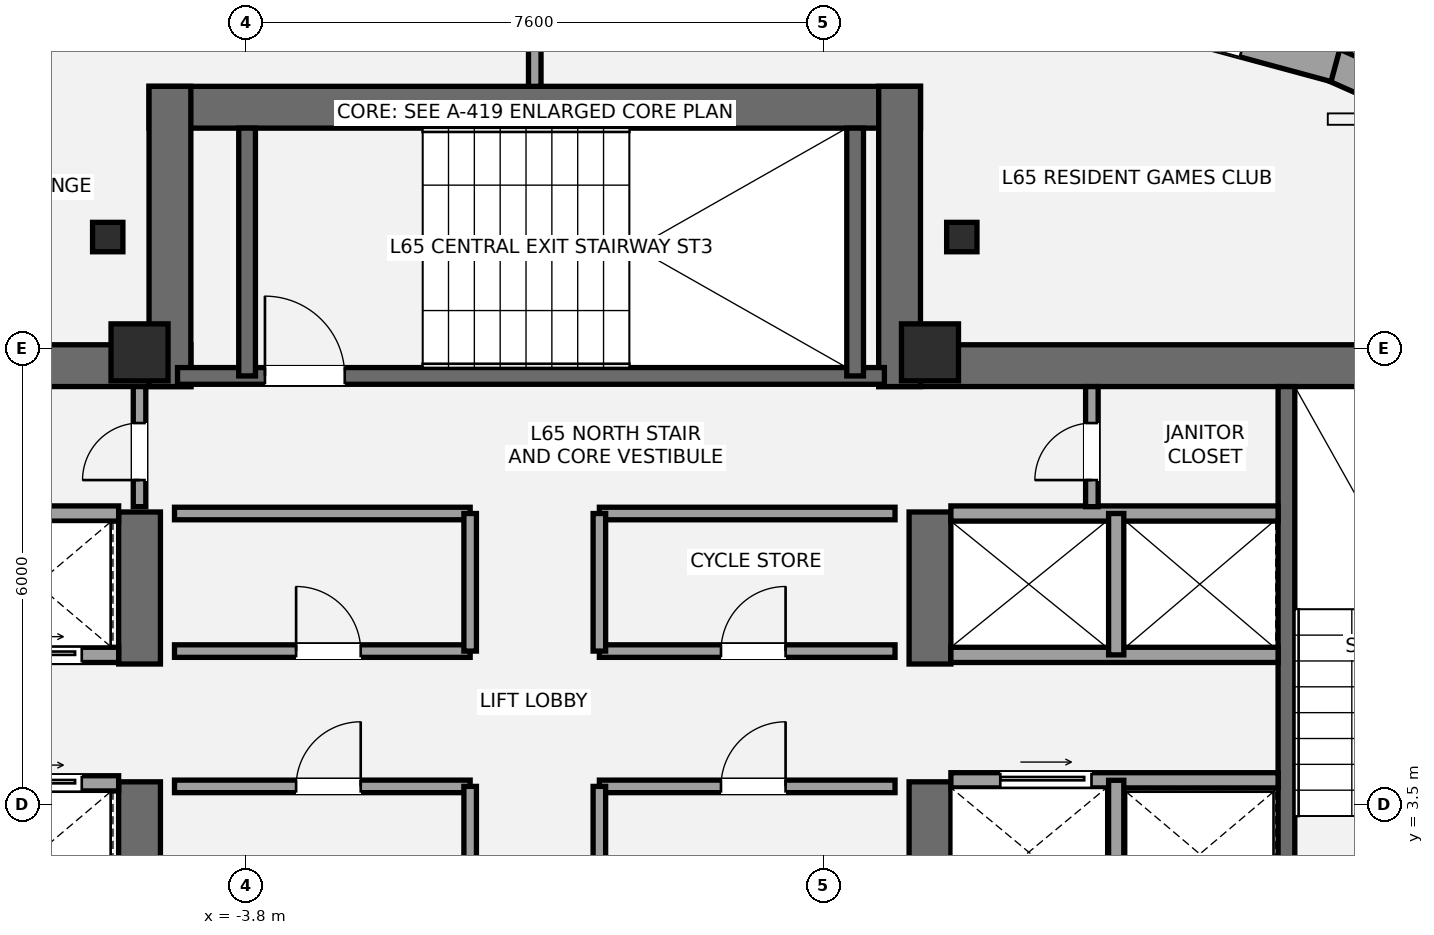
"""IFC4 building model, lengths in metres.
Left out: names, types, materials, properties, quantities, classifications, styles, units other than length and angle.
Written with IfcOpenShell. Run it as: python <this file> out.ifc"""

import sys

from ifc_helpers import new_model, si_unit, direction, frame, frame_2d, origin, origin_2d, place, context, subcontext, project, spatial, rectangle, i_section, extrude, element, fill, save


model = new_model("IFC4")
c1 = context("Model", 3, precision=1e-05, world=origin(), true_north=direction((0.0, 1.0)))
c2 = subcontext(c1, "Body", "Model", "MODEL_VIEW")
j1 = project(units=[si_unit("LENGTHUNIT", "METRE"), si_unit("PLANEANGLEUNIT", "RADIAN")], contexts=[c1])
p1 = place(None, origin())
s1 = spatial("IfcSite", under=j1, at=p1, CompositionType="ELEMENT")
p2 = place(p1, origin())
s2 = spatial("IfcBuilding", under=s1, at=p2, CompositionType="ELEMENT")
p3 = place(p2, frame((0.0, 0.0, 232.05)))
s3 = spatial("IfcBuildingStorey", under=s2, at=p3, CompositionType="ELEMENT", Elevation=232.05)
p4 = place(p3, frame((-13.7, 9.275, 0.0), z_axis=(0.0, 0.0, 1.0), x_axis=(1.0, 0.0, 0.0)))
e1 = element("IfcWall", 1, at=p4, inside=s3, PredefinedType="SHEAR", context=c2, shape_type="SweptSolid", body=[
    extrude(rectangle(XDim=9.175, YDim=0.55, at=frame_2d((4.587, 0.0))), origin(), (0.0, 0.0, 1.0), 3.15),
])
p5 = place(p3, frame((-5.2, 1.3, 0.0), z_axis=(0.0, 0.0, 1.0), x_axis=(0.0, 1.0, 0.0)))
e2 = element("IfcWall", 2, at=p5, inside=s3, PredefinedType="SHEAR", context=c2, shape_type="SweptSolid", body=[
    extrude(rectangle(XDim=2.5, YDim=0.55, at=frame_2d((1.25, 0.0))), origin(), (0.0, 0.0, 1.0), 3.15),
])
p6 = place(p3, frame((-5.2, 5.35, 0.0), z_axis=(0.0, 0.0, 1.0), x_axis=(0.0, 1.0, 0.0)))
e3 = element("IfcWall", 3, at=p6, inside=s3, PredefinedType="SHEAR", context=c2, shape_type="SweptSolid", body=[
    extrude(rectangle(XDim=2.0, YDim=0.55, at=frame_2d((1.0, 0.0))), origin(), (0.0, 0.0, 1.0), 3.15),
])
p7 = place(p3, frame((4.525, 9.275, 0.0), z_axis=(0.0, 0.0, 1.0), x_axis=(1.0, 0.0, 0.0)))
e4 = element("IfcWall", 4, at=p7, inside=s3, PredefinedType="SHEAR", context=c2, shape_type="SweptSolid", body=[
    extrude(rectangle(XDim=9.175, YDim=0.55, at=frame_2d((4.587, 0.0))), origin(), (0.0, 0.0, 1.0), 3.15),
])
p8 = place(p3, frame((5.2, 1.3, 0.0), z_axis=(0.0, 0.0, 1.0), x_axis=(0.0, 1.0, 0.0)))
e5 = element("IfcWall", 5, at=p8, inside=s3, PredefinedType="SHEAR", context=c2, shape_type="SweptSolid", body=[
    extrude(rectangle(XDim=2.5, YDim=0.55, at=frame_2d((1.25, 0.0))), origin(), (0.0, 0.0, 1.0), 3.15),
])
p9 = place(p3, frame((5.2, 5.35, 0.0), z_axis=(0.0, 0.0, 1.0), x_axis=(0.0, 1.0, 0.0)))
e6 = element("IfcWall", 6, at=p9, inside=s3, PredefinedType="SHEAR", context=c2, shape_type="SweptSolid", body=[
    extrude(rectangle(XDim=2.0, YDim=0.55, at=frame_2d((1.0, 0.0))), origin(), (0.0, 0.0, 1.0), 3.15),
])
p10 = place(p3, frame((9.89, 1.85, 0.0), z_axis=(0.0, 0.0, 1.0), x_axis=(0.0, 1.0, 0.0)))
e7 = element("IfcWall", 7, at=p10, inside=s3, PredefinedType="SHEAR", context=c2, shape_type="SweptSolid", body=[
    extrude(rectangle(XDim=7.15, YDim=0.22, at=frame_2d((3.575, 0.0))), origin(), (0.0, 0.0, 1.0), 3.15),
])
p11 = place(p3, frame((-5.075, 12.675, 0.0), z_axis=(0.0, 0.0, 1.0), x_axis=(1.0, 0.0, 0.0)))
e8 = element("IfcWall", 8, at=p11, inside=s3, PredefinedType="SHEAR", context=c2, shape_type="SweptSolid", body=[
    extrude(rectangle(XDim=10.15, YDim=0.55, at=frame_2d((5.075, 0.0))), origin(), (0.0, 0.0, 1.0), 3.15),
])
for number, where, z_axis, x_axis in (
    (9, (-4.8, 9.0, 0.0), (0.0, 0.0, 1.0), (0.0, 1.0, 0.0)),
    (10, (4.8, 9.0, 0.0), (0.0, 0.0, 1.0), (0.0, 1.0, 0.0)),
):
    element("IfcWall", number, at=place(p3, frame(where, z_axis=z_axis, x_axis=x_axis)), inside=s3, PredefinedType="SHEAR", context=c2, shape_type="SweptSolid", body=[
        extrude(rectangle(XDim=3.95, YDim=0.55, at=frame_2d((1.975, 0.0))), origin(), (0.0, 0.0, 1.0), 3.15),
    ])
p12 = place(p3, frame((-4.7, 9.14, 0.0), z_axis=(0.0, 0.0, 1.0), x_axis=(1.0, 0.0, 0.0)))
e11 = element("IfcWall", 11, at=p12, inside=s3, PredefinedType="SHEAR", context=c2, shape_type="SweptSolid", body=[
    extrude(rectangle(XDim=9.3, YDim=0.22, at=frame_2d((4.65, 0.0))), origin(), (0.0, 0.0, 1.0), 3.15),
])
p13 = place(p12, frame((1.15, 0.0, 0.0)))
e12 = element("IfcOpeningElement", 12, at=p13, cuts=e11, PredefinedType="OPENING", context=c2, shape_type="SweptSolid", body=[
    extrude(rectangle(XDim=1.05, YDim=2.15, at=frame_2d((0.525, 1.075))), frame((0.0, 0.12, 0.0), z_axis=(0.0, -1.0, 0.0), x_axis=(1.0, 0.0, 0.0)), (0.0, 0.0, 1.0), 0.24),
])
for number, where, z_axis, x_axis in (
    (13, (-3.785, 9.14, 0.0), (0.0, 0.0, 1.0), (0.0, 1.0, 0.0)),
    (14, (4.215, 9.14, 0.0), (0.0, 0.0, 1.0), (0.0, 1.0, 0.0)),
):
    element("IfcWall", number, at=place(p3, frame(where, z_axis=z_axis, x_axis=x_axis)), inside=s3, PredefinedType="SHEAR", context=c2, shape_type="SweptSolid", body=[
        extrude(rectangle(XDim=3.26, YDim=0.22, at=frame_2d((1.63, 0.0))), origin(), (0.0, 0.0, 1.0), 3.15),
    ])
for number, where, z_axis, x_axis in (
    (15, (-5.2, 9.45, 0.0), (0.0, 0.0, 1.0), (1.0, 0.0, 0.0)),
    (16, (5.2, 9.45, 0.0), (0.0, 0.0, 1.0), (1.0, 0.0, 0.0)),
):
    element("IfcColumn", number, at=place(p3, frame(where, z_axis=z_axis, x_axis=x_axis)), inside=s3, PredefinedType="PILASTER", context=c2, shape_type="SweptSolid", body=[
        extrude(rectangle(XDim=0.75, YDim=0.75, at=origin_2d()), origin(), (0.0, 0.0, 1.0), 3.15),
    ])
for number, where, z_axis, x_axis in (
    (17, (5.619, 10.967, 0.0), (0.0, 0.0, 1.0), (1.0, 0.0, 0.0)),
    (18, (-5.619, 10.967, 0.0), (0.0, 0.0, 1.0), (1.0, 0.0, 0.0)),
):
    element("IfcColumn", number, at=place(p3, frame(where, z_axis=z_axis, x_axis=x_axis)), inside=s3, PredefinedType="COLUMN", context=c2, shape_type="SweptSolid", body=[
        extrude(i_section(OverallWidth=0.399, OverallDepth=0.387, WebThickness=0.021, FlangeThickness=0.033, at=origin_2d()), origin(), (0.0, 0.0, 1.0), 3.15),
    ])
p14 = place(p3, frame((10.502, 13.236, 0.0), z_axis=(0.0, 0.0, 1.0), x_axis=(0.914197700285, -0.405268509501, 0.0)))
e19 = element("IfcWall", 19, at=p14, inside=s3, PredefinedType="STANDARD", context=c2, shape_type="SweptSolid", body=[
    extrude(rectangle(XDim=4.037, YDim=0.44, at=frame_2d((2.019, 0.0))), origin(), (0.0, 0.0, 1.0), 2.336),
])
p15 = place(p14, frame((0.746, 0.0, 0.55)))
e20 = element("IfcOpeningElement", 20, at=p15, cuts=e19, PredefinedType="OPENING", context=c2, shape_type="SweptSolid", body=[
    extrude(rectangle(XDim=1.75, YDim=1.55, at=frame_2d((0.875, 0.775))), frame((0.0, 0.23, 0.0), z_axis=(0.0, -1.0, 0.0), x_axis=(1.0, 0.0, 0.0)), (0.0, 0.0, 1.0), 0.46),
])
p16 = place(p3, frame((6.448, 14.331, 0.0), z_axis=(0.0, 0.0, 1.0), x_axis=(0.965250622562, -0.261325918429, 0.0)))
e21 = element("IfcWall", 21, at=p16, inside=s3, PredefinedType="STANDARD", context=c2, shape_type="SweptSolid", body=[
    extrude(rectangle(XDim=4.233, YDim=0.44, at=frame_2d((2.117, 0.0))), origin(), (0.0, 0.0, 1.0), 2.336),
])
p17 = place(p16, frame((1.59, 0.0, 0.55)))
e22 = element("IfcOpeningElement", 22, at=p17, cuts=e21, PredefinedType="OPENING", context=c2, shape_type="SweptSolid", body=[
    extrude(rectangle(XDim=1.4, YDim=1.55, at=frame_2d((0.7, 0.775))), frame((0.0, 0.23, 0.0), z_axis=(0.0, -1.0, 0.0), x_axis=(1.0, 0.0, 0.0)), (0.0, 0.0, 1.0), 0.46),
])
p18 = place(p3, frame((-9.78, 3.78, 0.0), z_axis=(0.0, 0.0, 1.0), x_axis=(1.0, 0.0, 0.0)))
e23 = element("IfcWall", 23, at=p18, inside=s3, PredefinedType="SOLIDWALL", context=c2, shape_type="SweptSolid", body=[
    extrude(rectangle(XDim=4.305, YDim=0.2, at=frame_2d((2.152, 0.0))), origin(), (0.0, 0.0, 1.0), 2.97),
])
p19 = place(p18, frame((2.72, 0.0, 0.0)))
e24 = element("IfcOpeningElement", 24, at=p19, cuts=e23, PredefinedType="OPENING", context=c2, shape_type="SweptSolid", body=[
    extrude(rectangle(XDim=1.1, YDim=2.2, at=frame_2d((0.55, 1.1))), frame((0.0, 0.11, 0.0), z_axis=(0.0, -1.0, 0.0), x_axis=(1.0, 0.0, 0.0)), (0.0, 0.0, 1.0), 0.22),
])
p20 = place(p3, frame((-9.78, 5.47, 0.0), z_axis=(0.0, 0.0, 1.0), x_axis=(1.0, 0.0, 0.0)))
e25 = element("IfcWall", 25, at=p20, inside=s3, PredefinedType="SOLIDWALL", context=c2, shape_type="SweptSolid", body=[
    extrude(rectangle(XDim=4.305, YDim=0.2, at=frame_2d((2.152, 0.0))), origin(), (0.0, 0.0, 1.0), 2.97),
])
p21 = place(p20, frame((0.55, 0.0, 0.0)))
e26 = element("IfcOpeningElement", 26, at=p21, cuts=e25, PredefinedType="OPENING", context=c2, shape_type="SweptSolid", body=[
    extrude(rectangle(XDim=1.1, YDim=2.2, at=frame_2d((0.55, 1.1))), frame((0.0, 0.11, 0.0), z_axis=(0.0, -1.0, 0.0), x_axis=(1.0, 0.0, 0.0)), (0.0, 0.0, 1.0), 0.22),
])
p22 = place(p20, frame((2.72, 0.0, 0.0)))
e27 = element("IfcOpeningElement", 27, at=p22, cuts=e25, PredefinedType="OPENING", context=c2, shape_type="SweptSolid", body=[
    extrude(rectangle(XDim=1.1, YDim=2.2, at=frame_2d((0.55, 1.1))), frame((0.0, 0.11, 0.0), z_axis=(0.0, -1.0, 0.0), x_axis=(1.0, 0.0, 0.0)), (0.0, 0.0, 1.0), 0.22),
])
p23 = place(p3, frame((-9.78, 7.33, 0.0), z_axis=(0.0, 0.0, 1.0), x_axis=(1.0, 0.0, 0.0)))
e28 = element("IfcWall", 28, at=p23, inside=s3, PredefinedType="SOLIDWALL", context=c2, shape_type="SweptSolid", body=[
    extrude(rectangle(XDim=4.305, YDim=0.2, at=frame_2d((2.152, 0.0))), origin(), (0.0, 0.0, 1.0), 2.97),
])
p24 = place(p3, frame((5.475, 3.82, 0.0), z_axis=(0.0, 0.0, 1.0), x_axis=(1.0, 0.0, 0.0)))
e29 = element("IfcWall", 29, at=p24, inside=s3, PredefinedType="SOLIDWALL", context=c2, shape_type="SweptSolid", body=[
    extrude(rectangle(XDim=4.305, YDim=0.2, at=frame_2d((2.152, 0.0))), origin(), (0.0, 0.0, 1.0), 2.97),
])
p25 = place(p24, frame((0.65, 0.0, 0.0)))
e30 = element("IfcOpeningElement", 30, at=p25, cuts=e29, PredefinedType="OPENING", context=c2, shape_type="SweptSolid", body=[
    extrude(rectangle(XDim=1.2, YDim=2.2, at=frame_2d((0.6, 1.1))), frame((0.0, 0.11, 0.0), z_axis=(0.0, -1.0, 0.0), x_axis=(1.0, 0.0, 0.0)), (0.0, 0.0, 1.0), 0.22),
])
p26 = place(p3, frame((7.65, 1.85, 0.0), z_axis=(0.0, 0.0, 1.0), x_axis=(0.0, 1.0, 0.0)))
e31 = element("IfcWall", 31, at=p26, inside=s3, PredefinedType="SOLIDWALL", context=c2, shape_type="SweptSolid", body=[
    extrude(rectangle(XDim=1.97, YDim=0.2, at=frame_2d((0.985, 0.0))), origin(), (0.0, 0.0, 1.0), 2.97),
])
for number, where, z_axis, x_axis in (
    (32, (5.475, 5.47, 0.0), (0.0, 0.0, 1.0), (1.0, 0.0, 0.0)),
    (33, (5.475, 7.33, 0.0), (0.0, 0.0, 1.0), (1.0, 0.0, 0.0)),
):
    element("IfcWall", number, at=place(p3, frame(where, z_axis=z_axis, x_axis=x_axis)), inside=s3, PredefinedType="SOLIDWALL", context=c2, shape_type="SweptSolid", body=[
        extrude(rectangle(XDim=4.305, YDim=0.2, at=frame_2d((2.152, 0.0))), origin(), (0.0, 0.0, 1.0), 2.97),
    ])
p27 = place(p3, frame((7.65, 5.47, 0.0), z_axis=(0.0, 0.0, 1.0), x_axis=(0.0, 1.0, 0.0)))
e34 = element("IfcWall", 34, at=p27, inside=s3, PredefinedType="SOLIDWALL", context=c2, shape_type="SweptSolid", body=[
    extrude(rectangle(XDim=1.86, YDim=0.2, at=frame_2d((0.93, 0.0))), origin(), (0.0, 0.0, 1.0), 2.97),
])
p28 = place(p3, frame((-4.74, 3.74, 0.0), z_axis=(0.0, 0.0, 1.0), x_axis=(1.0, 0.0, 0.0)))
e35 = element("IfcWall", 35, at=p28, inside=s3, PredefinedType="PARTITIONING", context=c2, shape_type="SweptSolid", body=[
    extrude(rectangle(XDim=3.89, YDim=0.165, at=frame_2d((1.945, 0.0))), origin(), (0.0, 0.0, 1.0), 2.97),
])
p29 = place(p28, frame((1.6, 0.0, 0.0)))
e36 = element("IfcOpeningElement", 36, at=p29, cuts=e35, PredefinedType="OPENING", context=c2, shape_type="SweptSolid", body=[
    extrude(rectangle(XDim=0.85, YDim=2.1, at=frame_2d((0.425, 1.05))), frame((0.0, 0.093, 0.0), z_axis=(0.0, -1.0, 0.0), x_axis=(1.0, 0.0, 0.0)), (0.0, 0.0, 1.0), 0.185),
])
p30 = place(p3, frame((-0.85, 1.92, 0.0), z_axis=(0.0, 0.0, 1.0), x_axis=(0.0, 1.0, 0.0)))
e37 = element("IfcWall", 37, at=p30, inside=s3, PredefinedType="PARTITIONING", context=c2, shape_type="SweptSolid", body=[
    extrude(rectangle(XDim=1.82, YDim=0.165, at=frame_2d((0.91, 0.0))), origin(), (0.0, 0.0, 1.0), 2.97),
])
p31 = place(p3, frame((0.85, 3.74, 0.0), z_axis=(0.0, 0.0, 1.0), x_axis=(1.0, 0.0, 0.0)))
e38 = element("IfcWall", 38, at=p31, inside=s3, PredefinedType="PARTITIONING", context=c2, shape_type="SweptSolid", body=[
    extrude(rectangle(XDim=3.89, YDim=0.165, at=frame_2d((1.945, 0.0))), origin(), (0.0, 0.0, 1.0), 2.97),
])
p32 = place(p31, frame((1.6, 0.0, 0.0)))
e39 = element("IfcOpeningElement", 39, at=p32, cuts=e38, PredefinedType="OPENING", context=c2, shape_type="SweptSolid", body=[
    extrude(rectangle(XDim=0.85, YDim=2.1, at=frame_2d((0.425, 1.05))), frame((0.0, 0.093, 0.0), z_axis=(0.0, -1.0, 0.0), x_axis=(1.0, 0.0, 0.0)), (0.0, 0.0, 1.0), 0.185),
])
p33 = place(p3, frame((0.85, 1.92, 0.0), z_axis=(0.0, 0.0, 1.0), x_axis=(0.0, 1.0, 0.0)))
e40 = element("IfcWall", 40, at=p33, inside=s3, PredefinedType="PARTITIONING", context=c2, shape_type="SweptSolid", body=[
    extrude(rectangle(XDim=1.82, YDim=0.165, at=frame_2d((0.91, 0.0))), origin(), (0.0, 0.0, 1.0), 2.97),
])
p34 = place(p3, frame((-4.74, 5.52, 0.0), z_axis=(0.0, 0.0, 1.0), x_axis=(1.0, 0.0, 0.0)))
e41 = element("IfcWall", 41, at=p34, inside=s3, PredefinedType="PARTITIONING", context=c2, shape_type="SweptSolid", body=[
    extrude(rectangle(XDim=3.89, YDim=0.165, at=frame_2d((1.945, 0.0))), origin(), (0.0, 0.0, 1.0), 2.97),
])
p35 = place(p34, frame((1.6, 0.0, 0.0)))
e42 = element("IfcOpeningElement", 42, at=p35, cuts=e41, PredefinedType="OPENING", context=c2, shape_type="SweptSolid", body=[
    extrude(rectangle(XDim=0.85, YDim=2.1, at=frame_2d((0.425, 1.05))), frame((0.0, 0.093, 0.0), z_axis=(0.0, -1.0, 0.0), x_axis=(1.0, 0.0, 0.0)), (0.0, 0.0, 1.0), 0.185),
])
p36 = place(p3, frame((-4.74, 7.33, 0.0), z_axis=(0.0, 0.0, 1.0), x_axis=(1.0, 0.0, 0.0)))
e43 = element("IfcWall", 43, at=p36, inside=s3, PredefinedType="PARTITIONING", context=c2, shape_type="SweptSolid", body=[
    extrude(rectangle(XDim=3.89, YDim=0.165, at=frame_2d((1.945, 0.0))), origin(), (0.0, 0.0, 1.0), 2.97),
])
p37 = place(p3, frame((-0.85, 5.52, 0.0), z_axis=(0.0, 0.0, 1.0), x_axis=(0.0, 1.0, 0.0)))
e44 = element("IfcWall", 44, at=p37, inside=s3, PredefinedType="PARTITIONING", context=c2, shape_type="SweptSolid", body=[
    extrude(rectangle(XDim=1.81, YDim=0.165, at=frame_2d((0.905, 0.0))), origin(), (0.0, 0.0, 1.0), 2.97),
])
p38 = place(p3, frame((0.85, 5.52, 0.0), z_axis=(0.0, 0.0, 1.0), x_axis=(1.0, 0.0, 0.0)))
e45 = element("IfcWall", 45, at=p38, inside=s3, PredefinedType="PARTITIONING", context=c2, shape_type="SweptSolid", body=[
    extrude(rectangle(XDim=3.89, YDim=0.165, at=frame_2d((1.945, 0.0))), origin(), (0.0, 0.0, 1.0), 2.97),
])
p39 = place(p38, frame((1.6, 0.0, 0.0)))
e46 = element("IfcOpeningElement", 46, at=p39, cuts=e45, PredefinedType="OPENING", context=c2, shape_type="SweptSolid", body=[
    extrude(rectangle(XDim=0.85, YDim=2.1, at=frame_2d((0.425, 1.05))), frame((0.0, 0.093, 0.0), z_axis=(0.0, -1.0, 0.0), x_axis=(1.0, 0.0, 0.0)), (0.0, 0.0, 1.0), 0.185),
])
p40 = place(p3, frame((0.85, 7.33, 0.0), z_axis=(0.0, 0.0, 1.0), x_axis=(1.0, 0.0, 0.0)))
e47 = element("IfcWall", 47, at=p40, inside=s3, PredefinedType="PARTITIONING", context=c2, shape_type="SweptSolid", body=[
    extrude(rectangle(XDim=3.89, YDim=0.165, at=frame_2d((1.945, 0.0))), origin(), (0.0, 0.0, 1.0), 2.97),
])
p41 = place(p3, frame((0.85, 5.52, 0.0), z_axis=(0.0, 0.0, 1.0), x_axis=(0.0, 1.0, 0.0)))
e48 = element("IfcWall", 48, at=p41, inside=s3, PredefinedType="PARTITIONING", context=c2, shape_type="SweptSolid", body=[
    extrude(rectangle(XDim=1.81, YDim=0.165, at=frame_2d((0.905, 0.0))), origin(), (0.0, 0.0, 1.0), 2.97),
])
p42 = place(p3, frame((-5.2, 7.42, 0.0), z_axis=(0.0, 0.0, 1.0), x_axis=(0.0, 1.0, 0.0)))
e49 = element("IfcWall", 49, at=p42, inside=s3, PredefinedType="PARTITIONING", context=c2, shape_type="SweptSolid", body=[
    extrude(rectangle(XDim=1.58, YDim=0.165, at=frame_2d((0.79, 0.0))), origin(), (0.0, 0.0, 1.0), 2.97),
])
p43 = place(p42, frame((0.35, 0.0, 0.0)))
e50 = element("IfcOpeningElement", 50, at=p43, cuts=e49, PredefinedType="OPENING", context=c2, shape_type="SweptSolid", body=[
    extrude(rectangle(XDim=0.75, YDim=2.1, at=frame_2d((0.375, 1.05))), frame((0.0, 0.093, 0.0), z_axis=(0.0, -1.0, 0.0), x_axis=(1.0, 0.0, 0.0)), (0.0, 0.0, 1.0), 0.185),
])
p44 = place(p3, frame((7.33, 7.42, 0.0), z_axis=(0.0, 0.0, 1.0), x_axis=(0.0, 1.0, 0.0)))
e51 = element("IfcWall", 51, at=p44, inside=s3, PredefinedType="PARTITIONING", context=c2, shape_type="SweptSolid", body=[
    extrude(rectangle(XDim=1.58, YDim=0.165, at=frame_2d((0.79, 0.0))), origin(), (0.0, 0.0, 1.0), 2.97),
])
p45 = place(p44, frame((0.35, 0.0, 0.0)))
e52 = element("IfcOpeningElement", 52, at=p45, cuts=e51, PredefinedType="OPENING", context=c2, shape_type="SweptSolid", body=[
    extrude(rectangle(XDim=0.75, YDim=2.1, at=frame_2d((0.375, 1.05))), frame((0.0, 0.093, 0.0), z_axis=(0.0, -1.0, 0.0), x_axis=(1.0, 0.0, 0.0)), (0.0, 0.0, 1.0), 0.185),
])
p46 = place(p3, frame((0.0, 12.95, 0.0), z_axis=(0.0, 0.0, 1.0), x_axis=(0.0, 1.0, 0.0)))
e53 = element("IfcWall", 53, at=p46, inside=s3, PredefinedType="PARTITIONING", context=c2, shape_type="SweptSolid", body=[
    extrude(rectangle(XDim=1.697, YDim=0.165, at=frame_2d((0.848, 0.0))), origin(), (0.0, 0.0, 1.0), 2.97),
])
p47 = place(p13, origin())
e54 = element("IfcDoor", 54, at=p47, inside=s3, OperationType="SINGLE_SWING_LEFT", PredefinedType="DOOR", context=c2, shape_type="SweptSolid", body=[
    extrude(rectangle(XDim=1.05, YDim=2.15, at=frame_2d((0.525, 1.075))), frame((0.0, 0.025, 0.0), z_axis=(0.0, -1.0, 0.0), x_axis=(1.0, 0.0, 0.0)), (0.0, 0.0, 1.0), 0.05),
])
fill(e12, e54)
p48 = place(p22, origin())
e55 = element("IfcDoor", 55, at=p48, inside=s3, OperationType="SLIDING_TO_LEFT", PredefinedType="DOOR", context=c2, shape_type="SweptSolid", body=[
    extrude(rectangle(XDim=1.1, YDim=2.2, at=frame_2d((0.55, 1.1))), frame((0.0, 0.025, 0.0), z_axis=(0.0, -1.0, 0.0), x_axis=(1.0, 0.0, 0.0)), (0.0, 0.0, 1.0), 0.05),
])
fill(e27, e55)
p49 = place(p19, origin())
e56 = element("IfcDoor", 56, at=p49, inside=s3, OperationType="SLIDING_TO_LEFT", PredefinedType="DOOR", context=c2, shape_type="SweptSolid", body=[
    extrude(rectangle(XDim=1.1, YDim=2.2, at=frame_2d((0.55, 1.1))), frame((0.0, 0.025, 0.0), z_axis=(0.0, -1.0, 0.0), x_axis=(1.0, 0.0, 0.0)), (0.0, 0.0, 1.0), 0.05),
])
fill(e24, e56)
p50 = place(p25, origin())
e57 = element("IfcDoor", 57, at=p50, inside=s3, OperationType="SLIDING_TO_RIGHT", PredefinedType="DOOR", context=c2, shape_type="SweptSolid", body=[
    extrude(rectangle(XDim=1.2, YDim=2.2, at=frame_2d((0.6, 1.1))), frame((0.0, 0.025, 0.0), z_axis=(0.0, -1.0, 0.0), x_axis=(1.0, 0.0, 0.0)), (0.0, 0.0, 1.0), 0.05),
])
fill(e30, e57)
p51 = place(p29, origin())
e58 = element("IfcDoor", 58, at=p51, inside=s3, OperationType="SINGLE_SWING_RIGHT", PredefinedType="DOOR", context=c2, shape_type="SweptSolid", body=[
    extrude(rectangle(XDim=0.85, YDim=2.1, at=frame_2d((0.425, 1.05))), frame((0.0, 0.025, 0.0), z_axis=(0.0, -1.0, 0.0), x_axis=(1.0, 0.0, 0.0)), (0.0, 0.0, 1.0), 0.05),
])
fill(e36, e58)
p52 = place(p32, origin())
e59 = element("IfcDoor", 59, at=p52, inside=s3, OperationType="SINGLE_SWING_RIGHT", PredefinedType="DOOR", context=c2, shape_type="SweptSolid", body=[
    extrude(rectangle(XDim=0.85, YDim=2.1, at=frame_2d((0.425, 1.05))), frame((0.0, 0.025, 0.0), z_axis=(0.0, -1.0, 0.0), x_axis=(1.0, 0.0, 0.0)), (0.0, 0.0, 1.0), 0.05),
])
fill(e39, e59)
p53 = place(p35, origin())
e60 = element("IfcDoor", 60, at=p53, inside=s3, OperationType="SINGLE_SWING_LEFT", PredefinedType="DOOR", context=c2, shape_type="SweptSolid", body=[
    extrude(rectangle(XDim=0.85, YDim=2.1, at=frame_2d((0.425, 1.05))), frame((0.0, 0.025, 0.0), z_axis=(0.0, -1.0, 0.0), x_axis=(1.0, 0.0, 0.0)), (0.0, 0.0, 1.0), 0.05),
])
fill(e42, e60)
p54 = place(p39, origin())
e61 = element("IfcDoor", 61, at=p54, inside=s3, OperationType="SINGLE_SWING_RIGHT", PredefinedType="DOOR", context=c2, shape_type="SweptSolid", body=[
    extrude(rectangle(XDim=0.85, YDim=2.1, at=frame_2d((0.425, 1.05))), frame((0.0, 0.025, 0.0), z_axis=(0.0, -1.0, 0.0), x_axis=(1.0, 0.0, 0.0)), (0.0, 0.0, 1.0), 0.05),
])
fill(e46, e61)
p55 = place(p43, origin())
e62 = element("IfcDoor", 62, at=p55, inside=s3, OperationType="SINGLE_SWING_LEFT", PredefinedType="DOOR", context=c2, shape_type="SweptSolid", body=[
    extrude(rectangle(XDim=0.75, YDim=2.1, at=frame_2d((0.375, 1.05))), frame((0.0, 0.025, 0.0), z_axis=(0.0, -1.0, 0.0), x_axis=(1.0, 0.0, 0.0)), (0.0, 0.0, 1.0), 0.05),
])
fill(e50, e62)
p56 = place(p45, origin())
e63 = element("IfcDoor", 63, at=p56, inside=s3, OperationType="SINGLE_SWING_LEFT", PredefinedType="DOOR", context=c2, shape_type="SweptSolid", body=[
    extrude(rectangle(XDim=0.75, YDim=2.1, at=frame_2d((0.375, 1.05))), frame((0.0, 0.025, 0.0), z_axis=(0.0, -1.0, 0.0), x_axis=(1.0, 0.0, 0.0)), (0.0, 0.0, 1.0), 0.05),
])
fill(e52, e63)
save(model, sys.argv[1])
